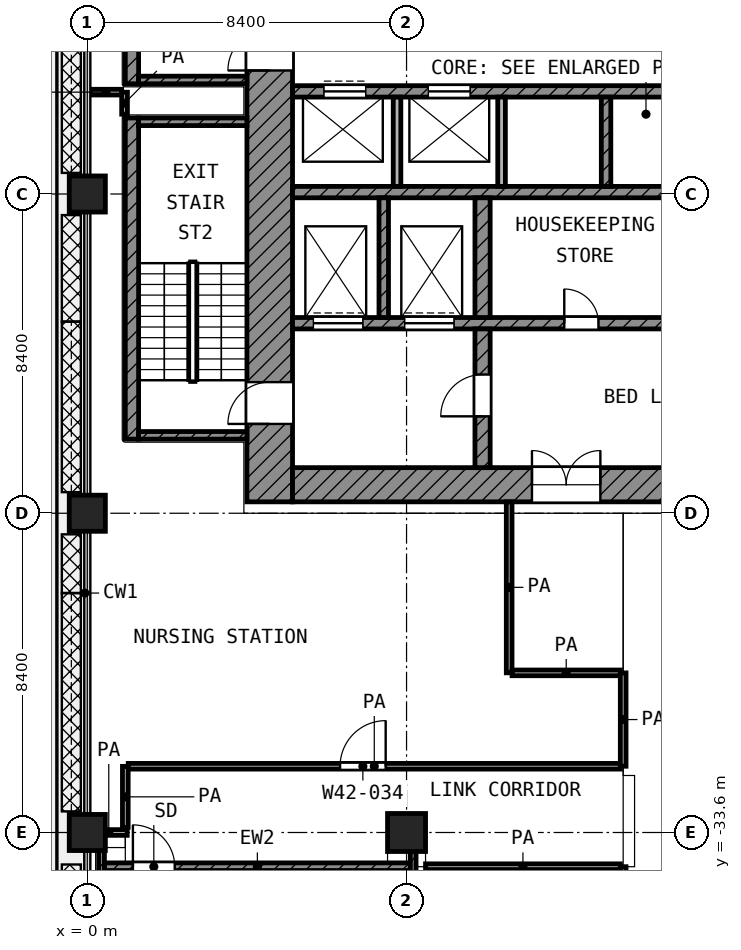
"""IFC4 building model, lengths in metres.
Left out: names, types, materials, properties, quantities, classifications, styles, units other than length and angle.
Written with IfcOpenShell. Run it as: python <this file> out.ifc"""

import sys

from ifc_helpers import new_model, si_unit, direction, frame, frame_2d, origin, origin_2d, place, context, subcontext, project, spatial, rectangle, extrude, element, fill, save


model = new_model("IFC4")
c1 = context("Model", 3, precision=1e-05, world=origin(), true_north=direction((0.0, 1.0)))
c2 = subcontext(c1, "Body", "Model", "MODEL_VIEW")
j1 = project(units=[si_unit("LENGTHUNIT", "METRE"), si_unit("PLANEANGLEUNIT", "RADIAN")], contexts=[c1])
p1 = place(None, origin())
s1 = spatial("IfcSite", under=j1, at=p1, CompositionType="ELEMENT")
p2 = place(p1, origin())
s2 = spatial("IfcBuilding", under=s1, at=p2, CompositionType="ELEMENT")
p3 = place(p2, frame((0.0, 0.0, 183.6)))
s3 = spatial("IfcBuildingStorey", under=s2, at=p3, CompositionType="ELEMENT", Elevation=183.6)
for number, where, z_axis, x_axis in (
    (1, (0.0, -16.8, 0.0), (0.0, 0.0, 1.0), (1.0, 0.0, 0.0)),
    (2, (0.0, -25.2, 0.0), (0.0, 0.0, 1.0), (1.0, 0.0, 0.0)),
    (3, (0.0, -33.6, 0.0), (0.0, 0.0, 1.0), (1.0, 0.0, 0.0)),
):
    element("IfcColumn", number, at=place(p3, frame(where, z_axis=z_axis, x_axis=x_axis)), inside=s3, PredefinedType="COLUMN", context=c2, shape_type="SweptSolid", body=[
        extrude(rectangle(XDim=0.95, YDim=0.95, at=origin_2d()), origin(), (0.0, 0.0, 1.0), 4.2),
    ])
p4 = place(p3, frame((8.4, -33.6, 0.0), z_axis=(0.0, 0.0, 1.0), x_axis=(1.0, 0.0, 0.0)))
e4 = element("IfcColumn", 4, at=p4, inside=s3, PredefinedType="COLUMN", context=c2, shape_type="SweptSolid", body=[
    extrude(rectangle(XDim=1.0, YDim=1.0, at=origin_2d()), origin(), (0.0, 0.0, 1.0), 4.2),
])
p5 = place(p3, frame((4.8, -24.9, 0.0), z_axis=(0.0, 0.0, 1.0), x_axis=(0.0, 1.0, 0.0)))
e5 = element("IfcWall", 5, at=p5, inside=s3, PredefinedType="SHEAR", context=c2, shape_type="SweptSolid", body=[
    extrude(rectangle(XDim=19.5, YDim=1.2, at=frame_2d((9.75, 0.0))), origin(), (0.0, 0.0, 1.0), 3.6),
])
p6 = place(p5, frame((11.35, 0.0, 0.0)))
e6 = element("IfcOpeningElement", 6, at=p6, cuts=e5, PredefinedType="OPENING", context=c2, shape_type="SweptSolid", body=[
    extrude(rectangle(XDim=1.1, YDim=2.1, at=frame_2d((0.55, 1.05))), frame((0.0, 0.61, 0.0), z_axis=(0.0, -1.0, 0.0), x_axis=(1.0, 0.0, 0.0)), (0.0, 0.0, 1.0), 1.22),
])
p7 = place(p5, frame((2.05, 0.0, 0.0)))
e7 = element("IfcOpeningElement", 7, at=p7, cuts=e5, PredefinedType="OPENING", context=c2, shape_type="SweptSolid", body=[
    extrude(rectangle(XDim=1.1, YDim=2.1, at=frame_2d((0.55, 1.05))), frame((0.0, 0.61, 0.0), z_axis=(0.0, -1.0, 0.0), x_axis=(1.0, 0.0, 0.0)), (0.0, 0.0, 1.0), 1.22),
])
p8 = place(p3, frame((5.4, -24.45, 0.0), z_axis=(0.0, 0.0, 1.0), x_axis=(1.0, 0.0, 0.0)))
e8 = element("IfcWall", 8, at=p8, inside=s3, PredefinedType="SHEAR", context=c2, shape_type="SweptSolid", body=[
    extrude(rectangle(XDim=18.6, YDim=0.9, at=frame_2d((9.3, 0.0))), origin(), (0.0, 0.0, 1.0), 3.6),
])
p9 = place(p8, frame((6.3, 0.0, 0.0)))
e9 = element("IfcOpeningElement", 9, at=p9, cuts=e8, PredefinedType="OPENING", context=c2, shape_type="SweptSolid", body=[
    extrude(rectangle(XDim=1.8, YDim=2.1, at=frame_2d((0.9, 1.05))), frame((0.0, 0.46, 0.0), z_axis=(0.0, -1.0, 0.0), x_axis=(1.0, 0.0, 0.0)), (0.0, 0.0, 1.0), 0.92),
])
p10 = place(p3, frame((5.4, -14.1, 0.0), z_axis=(0.0, 0.0, 1.0), x_axis=(1.0, 0.0, 0.0)))
e10 = element("IfcWall", 10, at=p10, inside=s3, PredefinedType="SHEAR", context=c2, shape_type="SweptSolid", body=[
    extrude(rectangle(XDim=16.65, YDim=0.3, at=frame_2d((8.325, 0.0))), origin(), (0.0, 0.0, 1.0), 3.6),
])
p11 = place(p10, frame((0.825, 0.0, 0.0)))
e11 = element("IfcOpeningElement", 11, at=p11, cuts=e10, PredefinedType="OPENING", context=c2, shape_type="SweptSolid", body=[
    extrude(rectangle(XDim=1.1, YDim=2.1, at=frame_2d((0.55, 1.05))), frame((0.0, 0.16, 0.0), z_axis=(0.0, -1.0, 0.0), x_axis=(1.0, 0.0, 0.0)), (0.0, 0.0, 1.0), 0.32),
])
p12 = place(p10, frame((3.575, 0.0, 0.0)))
e12 = element("IfcOpeningElement", 12, at=p12, cuts=e10, PredefinedType="OPENING", context=c2, shape_type="SweptSolid", body=[
    extrude(rectangle(XDim=1.1, YDim=2.1, at=frame_2d((0.55, 1.05))), frame((0.0, 0.16, 0.0), z_axis=(0.0, -1.0, 0.0), x_axis=(1.0, 0.0, 0.0)), (0.0, 0.0, 1.0), 0.32),
])
p13 = place(p3, frame((5.4, -16.75, 0.0), z_axis=(0.0, 0.0, 1.0), x_axis=(1.0, 0.0, 0.0)))
e13 = element("IfcWall", 13, at=p13, inside=s3, PredefinedType="SHEAR", context=c2, shape_type="SweptSolid", body=[
    extrude(rectangle(XDim=16.65, YDim=0.3, at=frame_2d((8.325, 0.0))), origin(), (0.0, 0.0, 1.0), 3.6),
])
p14 = place(p3, frame((5.4, -20.2, 0.0), z_axis=(0.0, 0.0, 1.0), x_axis=(1.0, 0.0, 0.0)))
e14 = element("IfcWall", 14, at=p14, inside=s3, PredefinedType="SHEAR", context=c2, shape_type="SweptSolid", body=[
    extrude(rectangle(XDim=14.65, YDim=0.3, at=frame_2d((7.325, 0.0))), origin(), (0.0, 0.0, 1.0), 3.6),
])
p15 = place(p14, frame((10.55, 0.0, 0.0)))
e15 = element("IfcOpeningElement", 15, at=p15, cuts=e14, PredefinedType="OPENING", context=c2, shape_type="SweptSolid", body=[
    extrude(rectangle(XDim=1.3, YDim=2.1, at=frame_2d((0.65, 1.05))), frame((0.0, 0.16, 0.0), z_axis=(0.0, -1.0, 0.0), x_axis=(1.0, 0.0, 0.0)), (0.0, 0.0, 1.0), 0.32),
])
p16 = place(p14, frame((12.95, 0.0, 0.0)))
e16 = element("IfcOpeningElement", 16, at=p16, cuts=e14, PredefinedType="OPENING", context=c2, shape_type="SweptSolid", body=[
    extrude(rectangle(XDim=1.3, YDim=2.1, at=frame_2d((0.65, 1.05))), frame((0.0, 0.16, 0.0), z_axis=(0.0, -1.0, 0.0), x_axis=(1.0, 0.0, 0.0)), (0.0, 0.0, 1.0), 0.32),
])
p17 = place(p14, frame((0.55, 0.0, 0.0)))
e17 = element("IfcOpeningElement", 17, at=p17, cuts=e14, PredefinedType="OPENING", context=c2, shape_type="SweptSolid", body=[
    extrude(rectangle(XDim=1.3, YDim=2.1, at=frame_2d((0.65, 1.05))), frame((0.0, 0.16, 0.0), z_axis=(0.0, -1.0, 0.0), x_axis=(1.0, 0.0, 0.0)), (0.0, 0.0, 1.0), 0.32),
])
p18 = place(p14, frame((2.95, 0.0, 0.0)))
e18 = element("IfcOpeningElement", 18, at=p18, cuts=e14, PredefinedType="OPENING", context=c2, shape_type="SweptSolid", body=[
    extrude(rectangle(XDim=1.3, YDim=2.1, at=frame_2d((0.65, 1.05))), frame((0.0, 0.16, 0.0), z_axis=(0.0, -1.0, 0.0), x_axis=(1.0, 0.0, 0.0)), (0.0, 0.0, 1.0), 0.32),
])
p19 = place(p14, frame((7.15, 0.0, 0.0)))
e19 = element("IfcOpeningElement", 19, at=p19, cuts=e14, PredefinedType="OPENING", context=c2, shape_type="SweptSolid", body=[
    extrude(rectangle(XDim=0.9, YDim=2.1, at=frame_2d((0.45, 1.05))), frame((0.0, 0.16, 0.0), z_axis=(0.0, -1.0, 0.0), x_axis=(1.0, 0.0, 0.0)), (0.0, 0.0, 1.0), 0.32),
])
p20 = place(p3, frame((10.4, -24.0, 0.0), z_axis=(0.0, 0.0, 1.0), x_axis=(0.0, 1.0, 0.0)))
e20 = element("IfcWall", 20, at=p20, inside=s3, PredefinedType="SHEAR", context=c2, shape_type="SweptSolid", body=[
    extrude(rectangle(XDim=3.65, YDim=0.4, at=frame_2d((1.825, 0.0))), origin(), (0.0, 0.0, 1.0), 3.6),
])
p21 = place(p20, frame((1.35, 0.0, 0.0)))
e21 = element("IfcOpeningElement", 21, at=p21, cuts=e20, PredefinedType="OPENING", context=c2, shape_type="SweptSolid", body=[
    extrude(rectangle(XDim=1.1, YDim=2.1, at=frame_2d((0.55, 1.05))), frame((0.0, 0.21, 0.0), z_axis=(0.0, -1.0, 0.0), x_axis=(1.0, 0.0, 0.0)), (0.0, 0.0, 1.0), 0.42),
])
p22 = place(p3, frame((10.4, -20.05, 0.0), z_axis=(0.0, 0.0, 1.0), x_axis=(0.0, 1.0, 0.0)))
e22 = element("IfcWall", 22, at=p22, inside=s3, PredefinedType="SHEAR", context=c2, shape_type="SweptSolid", body=[
    extrude(rectangle(XDim=3.15, YDim=0.4, at=frame_2d((1.575, 0.0))), origin(), (0.0, 0.0, 1.0), 3.6),
])
p23 = place(p3, frame((7.8, -20.05, 0.0), z_axis=(0.0, 0.0, 1.0), x_axis=(0.0, 1.0, 0.0)))
e23 = element("IfcWall", 23, at=p23, inside=s3, PredefinedType="SHEAR", context=c2, shape_type="SweptSolid", body=[
    extrude(rectangle(XDim=3.15, YDim=0.25, at=frame_2d((1.575, 0.0))), origin(), (0.0, 0.0, 1.0), 3.6),
])
for number, where, z_axis, x_axis in (
    (24, (8.15, -16.6, 0.0), (0.0, 0.0, 1.0), (0.0, 1.0, 0.0)),
    (25, (10.9, -16.6, 0.0), (0.0, 0.0, 1.0), (0.0, 1.0, 0.0)),
):
    element("IfcWall", number, at=place(p3, frame(where, z_axis=z_axis, x_axis=x_axis)), inside=s3, PredefinedType="PARTITIONING", context=c2, shape_type="SweptSolid", body=[
        extrude(rectangle(XDim=2.35, YDim=0.2, at=frame_2d((1.175, 0.0))), origin(), (0.0, 0.0, 1.0), 3.6),
    ])
p24 = place(p3, frame((13.65, -16.6, 0.0), z_axis=(0.0, 0.0, 1.0), x_axis=(0.0, 1.0, 0.0)))
e26 = element("IfcWall", 26, at=p24, inside=s3, PredefinedType="SHEAR", context=c2, shape_type="SweptSolid", body=[
    extrude(rectangle(XDim=2.35, YDim=0.25, at=frame_2d((1.175, 0.0))), origin(), (0.0, 0.0, 1.0), 3.6),
])
p25 = place(p3, frame((1.175, -13.9, 0.0), z_axis=(0.0, 0.0, 1.0), x_axis=(0.0, 1.0, 0.0)))
e27 = element("IfcWall", 27, at=p25, inside=s3, PredefinedType="SHEAR", context=c2, shape_type="SweptSolid", body=[
    extrude(rectangle(XDim=8.45, YDim=0.35, at=frame_2d((4.225, 0.0))), origin(), (0.0, 0.0, 1.0), 3.6),
])
p26 = place(p3, frame((1.35, -13.8, 0.0), z_axis=(0.0, 0.0, 1.0), x_axis=(1.0, 0.0, 0.0)))
e28 = element("IfcWall", 28, at=p26, inside=s3, PredefinedType="SHEAR", context=c2, shape_type="SweptSolid", body=[
    extrude(rectangle(XDim=2.85, YDim=0.2, at=frame_2d((1.425, 0.0))), origin(), (0.0, 0.0, 1.0), 3.6),
])
p27 = place(p3, frame((1.175, -23.25, 0.0), z_axis=(0.0, 0.0, 1.0), x_axis=(0.0, 1.0, 0.0)))
e29 = element("IfcWall", 29, at=p27, inside=s3, PredefinedType="SHEAR", context=c2, shape_type="SweptSolid", body=[
    extrude(rectangle(XDim=8.45, YDim=0.35, at=frame_2d((4.225, 0.0))), origin(), (0.0, 0.0, 1.0), 3.6),
])
for number, where, z_axis, x_axis in (
    (30, (1.35, -14.9, 0.0), (0.0, 0.0, 1.0), (1.0, 0.0, 0.0)),
    (31, (1.35, -23.15, 0.0), (0.0, 0.0, 1.0), (1.0, 0.0, 0.0)),
):
    element("IfcWall", number, at=place(p3, frame(where, z_axis=z_axis, x_axis=x_axis)), inside=s3, PredefinedType="SHEAR", context=c2, shape_type="SweptSolid", body=[
        extrude(rectangle(XDim=2.85, YDim=0.2, at=frame_2d((1.425, 0.0))), origin(), (0.0, 0.0, 1.0), 3.6),
    ])
p28 = place(p3, frame((0.375, -40.05, 0.0), z_axis=(0.0, 0.0, 1.0), x_axis=(0.0, 1.0, 0.0)))
e32 = element("IfcWall", 32, at=p28, inside=s3, PredefinedType="SHEAR", context=c2, shape_type="SweptSolid", body=[
    extrude(rectangle(XDim=5.975, YDim=0.15, at=frame_2d((2.988, 0.0))), origin(), (0.0, 0.0, 1.0), 3.6),
])
p29 = place(p3, frame((8.575, -40.05, 0.0), z_axis=(0.0, 0.0, 1.0), x_axis=(0.0, 1.0, 0.0)))
e33 = element("IfcWall", 33, at=p29, inside=s3, PredefinedType="SHEAR", context=c2, shape_type="SweptSolid", body=[
    extrude(rectangle(XDim=5.95, YDim=0.15, at=frame_2d((2.975, 0.0))), origin(), (0.0, 0.0, 1.0), 3.6),
])
p30 = place(p3, frame((0.45, -34.5, 0.0), z_axis=(0.0, 0.0, 1.0), x_axis=(1.0, 0.0, 0.0)))
e34 = element("IfcWall", 34, at=p30, inside=s3, PredefinedType="SHEAR", context=c2, shape_type="SweptSolid", body=[
    extrude(rectangle(XDim=8.05, YDim=0.2, at=frame_2d((4.025, 0.0))), origin(), (0.0, 0.0, 1.0), 3.6),
])
p31 = place(p30, frame((0.75, 0.0, 0.0)))
e35 = element("IfcOpeningElement", 35, at=p31, cuts=e34, PredefinedType="OPENING", context=c2, shape_type="SweptSolid", body=[
    extrude(rectangle(XDim=1.1, YDim=2.1, at=frame_2d((0.55, 1.05))), frame((0.0, 0.11, 0.0), z_axis=(0.0, -1.0, 0.0), x_axis=(1.0, 0.0, 0.0)), (0.0, 0.0, 1.0), 0.22),
])
p32 = place(p3, frame((8.9, -34.5, 0.0), z_axis=(0.0, 0.0, 1.0), x_axis=(1.0, 0.0, 0.0)))
e36 = element("IfcWall", 36, at=p32, inside=s3, PredefinedType="PARTITIONING", context=c2, shape_type="SweptSolid", body=[
    extrude(rectangle(XDim=5.125, YDim=0.15, at=frame_2d((2.562, 0.0))), origin(), (0.0, 0.0, 1.0), 3.6),
])
p33 = place(p3, frame((0.08, -33.6, 0.0), z_axis=(0.0, 0.0, 1.0), x_axis=(1.0, 0.0, 0.0)))
e37 = element("IfcWall", 37, at=p33, inside=s3, PredefinedType="PARTITIONING", context=c2, shape_type="SweptSolid", body=[
    extrude(rectangle(XDim=0.97, YDim=0.15, at=frame_2d((0.485, 0.0))), origin(), (0.0, 0.0, 1.0), 3.6),
])
p34 = place(p3, frame((1.077, -31.857, 0.0), z_axis=(0.0, 0.0, 1.0), x_axis=(1.0, 0.0, 0.0)))
e38 = element("IfcWall", 38, at=p34, inside=s3, PredefinedType="PARTITIONING", context=c2, shape_type="SweptSolid", body=[
    extrude(rectangle(XDim=12.948, YDim=0.15, at=frame_2d((6.474, 0.0))), origin(), (0.0, 0.0, 1.0), 3.6),
])
p35 = place(p34, frame((5.574, 0.0, 0.0)))
e39 = element("IfcOpeningElement", 39, at=p35, cuts=e38, PredefinedType="OPENING", context=c2, shape_type="SweptSolid", body=[
    extrude(rectangle(XDim=1.2, YDim=2.1, at=frame_2d((0.6, 1.05))), frame((0.0, 0.085, 0.0), z_axis=(0.0, -1.0, 0.0), x_axis=(1.0, 0.0, 0.0)), (0.0, 0.0, 1.0), 0.17),
])
p36 = place(p3, frame((11.177, -29.4, 0.0), z_axis=(0.0, 0.0, 1.0), x_axis=(1.0, 0.0, 0.0)))
e40 = element("IfcWall", 40, at=p36, inside=s3, PredefinedType="PARTITIONING", context=c2, shape_type="SweptSolid", body=[
    extrude(rectangle(XDim=2.848, YDim=0.15, at=frame_2d((1.424, 0.0))), origin(), (0.0, 0.0, 1.0), 3.6),
])
p37 = place(p3, frame((0.08, -14.12, 0.0), z_axis=(0.0, 0.0, 1.0), x_axis=(1.0, 0.0, 0.0)))
e41 = element("IfcWall", 41, at=p37, inside=s3, PredefinedType="PARTITIONING", context=c2, shape_type="SweptSolid", body=[
    extrude(rectangle(XDim=0.824, YDim=0.15, at=frame_2d((0.412, 0.0))), origin(), (0.0, 0.0, 1.0), 3.6),
])
p38 = place(p3, frame((0.98, -14.7, 0.0), z_axis=(0.0, 0.0, 1.0), x_axis=(0.0, 1.0, 0.0)))
e42 = element("IfcWall", 42, at=p38, inside=s3, PredefinedType="PARTITIONING", context=c2, shape_type="SweptSolid", body=[
    extrude(rectangle(XDim=0.578, YDim=0.15, at=frame_2d((0.289, 0.0))), origin(), (0.0, 0.0, 1.0), 3.6),
])
p39 = place(p3, frame((1.0, -33.465, 0.0), z_axis=(0.0, 0.0, 1.0), x_axis=(0.0, 1.0, 0.0)))
e43 = element("IfcWall", 43, at=p39, inside=s3, PredefinedType="PARTITIONING", context=c2, shape_type="SweptSolid", body=[
    extrude(rectangle(XDim=1.606, YDim=0.15, at=frame_2d((0.803, 0.0))), origin(), (0.0, 0.0, 1.0), 3.6),
])
p40 = place(p3, frame((11.1, -29.399, 0.0), z_axis=(0.0, 0.0, 1.0), x_axis=(0.0, 1.0, 0.0)))
e44 = element("IfcWall", 44, at=p40, inside=s3, PredefinedType="PARTITIONING", context=c2, shape_type="SweptSolid", body=[
    extrude(rectangle(XDim=4.499, YDim=0.15, at=frame_2d((2.25, 0.0))), origin(), (0.0, 0.0, 1.0), 3.6),
])
p41 = place(p3, frame((14.1, -39.95, 0.0), z_axis=(0.0, 0.0, 1.0), x_axis=(0.0, 1.0, 0.0)))
e45 = element("IfcWall", 45, at=p41, inside=s3, PredefinedType="PARTITIONING", context=c2, shape_type="SweptSolid", body=[
    extrude(rectangle(XDim=5.45, YDim=0.15, at=frame_2d((2.725, 0.0))), origin(), (0.0, 0.0, 1.0), 3.6),
])
p42 = place(p41, frame((2.225, 0.0, 0.0)))
e46 = element("IfcOpeningElement", 46, at=p42, cuts=e45, PredefinedType="OPENING", context=c2, shape_type="SweptSolid", body=[
    extrude(rectangle(XDim=1.0, YDim=2.1, at=frame_2d((0.5, 1.05))), frame((0.0, 0.085, 0.0), z_axis=(0.0, -1.0, 0.0), x_axis=(1.0, 0.0, 0.0)), (0.0, 0.0, 1.0), 0.17),
])
p43 = place(p3, frame((14.1, -31.857, 0.0), z_axis=(0.0, 0.0, 1.0), x_axis=(0.0, 1.0, 0.0)))
e47 = element("IfcWall", 47, at=p43, inside=s3, PredefinedType="PARTITIONING", context=c2, shape_type="SweptSolid", body=[
    extrude(rectangle(XDim=2.457, YDim=0.15, at=frame_2d((1.229, 0.0))), origin(), (0.0, 0.0, 1.0), 3.6),
])
p44 = place(p11, origin())
e48 = element("IfcDoor", 48, at=p44, inside=s3, OperationType="DOUBLE_DOOR_SLIDING", PredefinedType="DOOR", context=c2, shape_type="SweptSolid", body=[
    extrude(rectangle(XDim=1.1, YDim=2.1, at=frame_2d((0.55, 1.05))), frame((0.0, 0.025, 0.0), z_axis=(0.0, -1.0, 0.0), x_axis=(1.0, 0.0, 0.0)), (0.0, 0.0, 1.0), 0.05),
])
fill(e11, e48)
p45 = place(p12, origin())
e49 = element("IfcDoor", 49, at=p45, inside=s3, OperationType="DOUBLE_DOOR_SLIDING", PredefinedType="DOOR", context=c2, shape_type="SweptSolid", body=[
    extrude(rectangle(XDim=1.1, YDim=2.1, at=frame_2d((0.55, 1.05))), frame((0.0, 0.025, 0.0), z_axis=(0.0, -1.0, 0.0), x_axis=(1.0, 0.0, 0.0)), (0.0, 0.0, 1.0), 0.05),
])
fill(e12, e49)
p46 = place(p17, origin())
e50 = element("IfcDoor", 50, at=p46, inside=s3, OperationType="DOUBLE_DOOR_SLIDING", PredefinedType="DOOR", context=c2, shape_type="SweptSolid", body=[
    extrude(rectangle(XDim=1.3, YDim=2.1, at=frame_2d((0.65, 1.05))), frame((0.0, 0.025, 0.0), z_axis=(0.0, -1.0, 0.0), x_axis=(1.0, 0.0, 0.0)), (0.0, 0.0, 1.0), 0.05),
])
fill(e17, e50)
p47 = place(p18, origin())
e51 = element("IfcDoor", 51, at=p47, inside=s3, OperationType="DOUBLE_DOOR_SLIDING", PredefinedType="DOOR", context=c2, shape_type="SweptSolid", body=[
    extrude(rectangle(XDim=1.3, YDim=2.1, at=frame_2d((0.65, 1.05))), frame((0.0, 0.025, 0.0), z_axis=(0.0, -1.0, 0.0), x_axis=(1.0, 0.0, 0.0)), (0.0, 0.0, 1.0), 0.05),
])
fill(e18, e51)
p48 = place(p6, origin())
e52 = element("IfcDoor", 52, at=p48, inside=s3, OperationType="SINGLE_SWING_LEFT", PredefinedType="DOOR", context=c2, shape_type="SweptSolid", body=[
    extrude(rectangle(XDim=1.1, YDim=2.1, at=frame_2d((0.55, 1.05))), frame((0.0, 0.025, 0.0), z_axis=(0.0, -1.0, 0.0), x_axis=(1.0, 0.0, 0.0)), (0.0, 0.0, 1.0), 0.05),
])
fill(e6, e52)
p49 = place(p7, origin())
e53 = element("IfcDoor", 53, at=p49, inside=s3, OperationType="SINGLE_SWING_LEFT", PredefinedType="DOOR", context=c2, shape_type="SweptSolid", body=[
    extrude(rectangle(XDim=1.1, YDim=2.1, at=frame_2d((0.55, 1.05))), frame((0.0, 0.025, 0.0), z_axis=(0.0, -1.0, 0.0), x_axis=(1.0, 0.0, 0.0)), (0.0, 0.0, 1.0), 0.05),
])
fill(e7, e53)
p50 = place(p21, origin())
e54 = element("IfcDoor", 54, at=p50, inside=s3, OperationType="SINGLE_SWING_LEFT", PredefinedType="DOOR", context=c2, shape_type="SweptSolid", body=[
    extrude(rectangle(XDim=1.1, YDim=2.1, at=frame_2d((0.55, 1.05))), frame((0.0, 0.025, 0.0), z_axis=(0.0, -1.0, 0.0), x_axis=(1.0, 0.0, 0.0)), (0.0, 0.0, 1.0), 0.05),
])
fill(e21, e54)
p51 = place(p9, origin())
e55 = element("IfcDoor", 55, at=p51, inside=s3, OperationType="DOUBLE_DOOR_SINGLE_SWING", PredefinedType="DOOR", context=c2, shape_type="SweptSolid", body=[
    extrude(rectangle(XDim=1.8, YDim=2.1, at=frame_2d((0.9, 1.05))), frame((0.0, 0.025, 0.0), z_axis=(0.0, -1.0, 0.0), x_axis=(1.0, 0.0, 0.0)), (0.0, 0.0, 1.0), 0.05),
])
fill(e9, e55)
p52 = place(p19, origin())
e56 = element("IfcDoor", 56, at=p52, inside=s3, OperationType="SINGLE_SWING_LEFT", PredefinedType="DOOR", context=c2, shape_type="SweptSolid", body=[
    extrude(rectangle(XDim=0.9, YDim=2.1, at=frame_2d((0.45, 1.05))), frame((0.0, 0.025, 0.0), z_axis=(0.0, -1.0, 0.0), x_axis=(1.0, 0.0, 0.0)), (0.0, 0.0, 1.0), 0.05),
])
fill(e19, e56)
p53 = place(p31, origin())
e57 = element("IfcDoor", 57, at=p53, inside=s3, OperationType="SINGLE_SWING_LEFT", PredefinedType="DOOR", context=c2, shape_type="SweptSolid", body=[
    extrude(rectangle(XDim=1.1, YDim=2.1, at=frame_2d((0.55, 1.05))), frame((0.0, 0.025, 0.0), z_axis=(0.0, -1.0, 0.0), x_axis=(1.0, 0.0, 0.0)), (0.0, 0.0, 1.0), 0.05),
])
fill(e35, e57)
p54 = place(p35, origin())
e58 = element("IfcDoor", 58, at=p54, inside=s3, OperationType="SINGLE_SWING_RIGHT", PredefinedType="DOOR", context=c2, shape_type="SweptSolid", body=[
    extrude(rectangle(XDim=1.2, YDim=2.1, at=frame_2d((0.6, 1.05))), frame((0.0, 0.025, 0.0), z_axis=(0.0, -1.0, 0.0), x_axis=(1.0, 0.0, 0.0)), (0.0, 0.0, 1.0), 0.05),
])
fill(e39, e58)
save(model, sys.argv[1])
